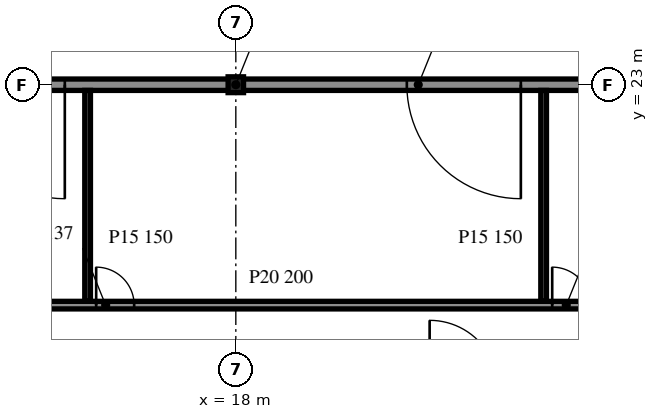
"""IFC4 building model, lengths in metres.
Left out: names, types, materials, properties, quantities, classifications, styles, units other than length and angle.
Written with IfcOpenShell. Run it as: python <this file> out.ifc"""

import sys

from ifc_helpers import new_model, si_unit, direction, frame, frame_2d, origin, origin_2d, place, context, subcontext, project, spatial, rectangle, i_section, extrude, element, fill, save


model = new_model("IFC4")
c1 = context("Model", 3, precision=1e-05, world=origin(), true_north=direction((0.0, 1.0)))
c2 = subcontext(c1, "Body", "Model", "MODEL_VIEW")
j1 = project(units=[si_unit("LENGTHUNIT", "METRE"), si_unit("PLANEANGLEUNIT", "RADIAN")], contexts=[c1])
p1 = place(None, origin())
s1 = spatial("IfcSite", under=j1, at=p1, CompositionType="ELEMENT")
p2 = place(p1, origin())
s2 = spatial("IfcBuilding", under=s1, at=p2, CompositionType="ELEMENT")
p3 = place(p2, frame((0.0, 0.0, 159.2)))
s3 = spatial("IfcBuildingStorey", under=s2, at=p3, CompositionType="ELEMENT", Elevation=159.2)
p4 = place(p3, frame((18.0, 23.0, -0.34), z_axis=(0.0, 0.0, 1.0), x_axis=(1.0, 0.0, 0.0)))
e1 = element("IfcColumn", 1, at=p4, inside=s3, PredefinedType="COLUMN", context=c2, shape_type="SweptSolid", body=[
    extrude(i_section(OverallWidth=0.406, OverallDepth=0.417, WebThickness=0.03, FlangeThickness=0.048, at=origin_2d()), origin(), (0.0, 0.0, 1.0), 3.8),
])
p5 = place(p3, frame((29.985, 23.0, 0.0), z_axis=(0.0, 0.0, 1.0), x_axis=(-1.0, 0.0, 0.0)))
e2 = element("IfcWall", 2, at=p5, inside=s3, PredefinedType="NOTDEFINED", context=c2, shape_type="SweptSolid", body=[
    extrude(rectangle(XDim=11.97, YDim=0.3, at=frame_2d((5.985, 0.0))), origin(), (0.0, 0.0, 1.0), 2.782),
])
p6 = place(p5, frame((4.485, 0.0, 0.0)))
e3 = element("IfcOpeningElement", 3, at=p6, cuts=e2, PredefinedType="OPENING", context=c2, shape_type="SweptSolid", body=[
    extrude(rectangle(XDim=3.0, YDim=2.4, at=frame_2d((1.5, 1.2))), frame((0.0, 0.16, 0.0), z_axis=(0.0, -1.0, 0.0), x_axis=(1.0, 0.0, 0.0)), (0.0, 0.0, 1.0), 0.32),
])
p7 = place(p3, frame((17.985, 23.0, 0.0), z_axis=(0.0, 0.0, 1.0), x_axis=(-1.0, 0.0, 0.0)))
e4 = element("IfcWall", 4, at=p7, inside=s3, PredefinedType="NOTDEFINED", context=c2, shape_type="SweptSolid", body=[
    extrude(rectangle(XDim=11.97, YDim=0.3, at=frame_2d((5.985, 0.0))), origin(), (0.0, 0.0, 1.0), 2.782),
])
p8 = place(p7, frame((4.485, 0.0, 0.0)))
e5 = element("IfcOpeningElement", 5, at=p8, cuts=e4, PredefinedType="OPENING", context=c2, shape_type="SweptSolid", body=[
    extrude(rectangle(XDim=3.0, YDim=2.4, at=frame_2d((1.5, 1.2))), frame((0.0, 0.16, 0.0), z_axis=(0.0, -1.0, 0.0), x_axis=(1.0, 0.0, 0.0)), (0.0, 0.0, 1.0), 0.32),
])
p9 = place(p3, frame((-47.975, 17.2, 0.0), z_axis=(0.0, 0.0, 1.0), x_axis=(1.0, 0.0, 0.0)))
e6 = element("IfcWall", 6, at=p9, inside=s3, PredefinedType="PARTITIONING", context=c2, shape_type="SweptSolid", body=[
    extrude(rectangle(XDim=95.95, YDim=0.2, at=frame_2d((47.975, 0.0))), origin(), (0.0, 0.0, 1.0), 3.46),
])
p10 = place(p9, frame((4.5, 0.0, 0.0)))
e7 = element("IfcOpeningElement", 7, at=p10, cuts=e6, PredefinedType="OPENING", context=c2, shape_type="SweptSolid", body=[
    extrude(rectangle(XDim=1.0, YDim=2.1, at=frame_2d((0.5, 1.05))), frame((0.0, 0.11, 0.0), z_axis=(0.0, -1.0, 0.0), x_axis=(1.0, 0.0, 0.0)), (0.0, 0.0, 1.0), 0.22),
])
p11 = place(p9, frame((10.5, 0.0, 0.0)))
e8 = element("IfcOpeningElement", 8, at=p11, cuts=e6, PredefinedType="OPENING", context=c2, shape_type="SweptSolid", body=[
    extrude(rectangle(XDim=1.0, YDim=2.1, at=frame_2d((0.5, 1.05))), frame((0.0, 0.11, 0.0), z_axis=(0.0, -1.0, 0.0), x_axis=(1.0, 0.0, 0.0)), (0.0, 0.0, 1.0), 0.22),
])
p12 = place(p9, frame((22.7, 0.0, 0.0)))
e9 = element("IfcOpeningElement", 9, at=p12, cuts=e6, PredefinedType="OPENING", context=c2, shape_type="SweptSolid", body=[
    extrude(rectangle(XDim=0.9, YDim=2.1, at=frame_2d((0.45, 1.05))), frame((0.0, 0.11, 0.0), z_axis=(0.0, -1.0, 0.0), x_axis=(1.0, 0.0, 0.0)), (0.0, 0.0, 1.0), 0.22),
])
p13 = place(p9, frame((25.7, 0.0, 0.0)))
e10 = element("IfcOpeningElement", 10, at=p13, cuts=e6, PredefinedType="OPENING", context=c2, shape_type="SweptSolid", body=[
    extrude(rectangle(XDim=1.2, YDim=2.1, at=frame_2d((0.6, 1.05))), frame((0.0, 0.11, 0.0), z_axis=(0.0, -1.0, 0.0), x_axis=(1.0, 0.0, 0.0)), (0.0, 0.0, 1.0), 0.22),
])
p14 = place(p9, frame((28.7, 0.0, 0.0)))
e11 = element("IfcOpeningElement", 11, at=p14, cuts=e6, PredefinedType="OPENING", context=c2, shape_type="SweptSolid", body=[
    extrude(rectangle(XDim=0.9, YDim=2.1, at=frame_2d((0.45, 1.05))), frame((0.0, 0.11, 0.0), z_axis=(0.0, -1.0, 0.0), x_axis=(1.0, 0.0, 0.0)), (0.0, 0.0, 1.0), 0.22),
])
p15 = place(p9, frame((36.7, 0.0, 0.0)))
e12 = element("IfcOpeningElement", 12, at=p15, cuts=e6, PredefinedType="OPENING", context=c2, shape_type="SweptSolid", body=[
    extrude(rectangle(XDim=1.0, YDim=2.1, at=frame_2d((0.5, 1.05))), frame((0.0, 0.11, 0.0), z_axis=(0.0, -1.0, 0.0), x_axis=(1.0, 0.0, 0.0)), (0.0, 0.0, 1.0), 0.22),
])
p16 = place(p9, frame((46.5, 0.0, 0.0)))
e13 = element("IfcOpeningElement", 13, at=p16, cuts=e6, PredefinedType="OPENING", context=c2, shape_type="SweptSolid", body=[
    extrude(rectangle(XDim=1.0, YDim=2.1, at=frame_2d((0.5, 1.05))), frame((0.0, 0.11, 0.0), z_axis=(0.0, -1.0, 0.0), x_axis=(1.0, 0.0, 0.0)), (0.0, 0.0, 1.0), 0.22),
])
p17 = place(p9, frame((48.1, 0.0, 0.0)))
e14 = element("IfcOpeningElement", 14, at=p17, cuts=e6, PredefinedType="OPENING", context=c2, shape_type="SweptSolid", body=[
    extrude(rectangle(XDim=0.9, YDim=2.1, at=frame_2d((0.45, 1.05))), frame((0.0, 0.11, 0.0), z_axis=(0.0, -1.0, 0.0), x_axis=(1.0, 0.0, 0.0)), (0.0, 0.0, 1.0), 0.22),
])
p18 = place(p9, frame((51.5, 0.0, 0.0)))
e15 = element("IfcOpeningElement", 15, at=p18, cuts=e6, PredefinedType="OPENING", context=c2, shape_type="SweptSolid", body=[
    extrude(rectangle(XDim=1.2, YDim=2.1, at=frame_2d((0.6, 1.05))), frame((0.0, 0.11, 0.0), z_axis=(0.0, -1.0, 0.0), x_axis=(1.0, 0.0, 0.0)), (0.0, 0.0, 1.0), 0.22),
])
p19 = place(p9, frame((54.1, 0.0, 0.0)))
e16 = element("IfcOpeningElement", 16, at=p19, cuts=e6, PredefinedType="OPENING", context=c2, shape_type="SweptSolid", body=[
    extrude(rectangle(XDim=0.9, YDim=2.1, at=frame_2d((0.45, 1.05))), frame((0.0, 0.11, 0.0), z_axis=(0.0, -1.0, 0.0), x_axis=(1.0, 0.0, 0.0)), (0.0, 0.0, 1.0), 0.22),
])
p20 = place(p9, frame((62.3, 0.0, 0.0)))
e17 = element("IfcOpeningElement", 17, at=p20, cuts=e6, PredefinedType="OPENING", context=c2, shape_type="SweptSolid", body=[
    extrude(rectangle(XDim=1.0, YDim=2.1, at=frame_2d((0.5, 1.05))), frame((0.0, 0.11, 0.0), z_axis=(0.0, -1.0, 0.0), x_axis=(1.0, 0.0, 0.0)), (0.0, 0.0, 1.0), 0.22),
])
p21 = place(p9, frame((74.3, 0.0, 0.0)))
e18 = element("IfcOpeningElement", 18, at=p21, cuts=e6, PredefinedType="OPENING", context=c2, shape_type="SweptSolid", body=[
    extrude(rectangle(XDim=1.0, YDim=2.1, at=frame_2d((0.5, 1.05))), frame((0.0, 0.11, 0.0), z_axis=(0.0, -1.0, 0.0), x_axis=(1.0, 0.0, 0.0)), (0.0, 0.0, 1.0), 0.22),
])
p22 = place(p9, frame((78.1, 0.0, 0.0)))
e19 = element("IfcOpeningElement", 19, at=p22, cuts=e6, PredefinedType="OPENING", context=c2, shape_type="SweptSolid", body=[
    extrude(rectangle(XDim=0.9, YDim=2.1, at=frame_2d((0.45, 1.05))), frame((0.0, 0.11, 0.0), z_axis=(0.0, -1.0, 0.0), x_axis=(1.0, 0.0, 0.0)), (0.0, 0.0, 1.0), 0.22),
])
p23 = place(p9, frame((84.1, 0.0, 0.0)))
e20 = element("IfcOpeningElement", 20, at=p23, cuts=e6, PredefinedType="OPENING", context=c2, shape_type="SweptSolid", body=[
    extrude(rectangle(XDim=1.2, YDim=2.1, at=frame_2d((0.6, 1.05))), frame((0.0, 0.11, 0.0), z_axis=(0.0, -1.0, 0.0), x_axis=(1.0, 0.0, 0.0)), (0.0, 0.0, 1.0), 0.22),
])
for number, where, z_axis, x_axis in (
    (21, (14.1, 17.3, 0.0), (0.0, 0.0, 1.0), (0.0, 1.0, 0.0)),
    (22, (26.1, 17.3, 0.0), (0.0, 0.0, 1.0), (0.0, 1.0, 0.0)),
):
    element("IfcWall", number, at=place(p3, frame(where, z_axis=z_axis, x_axis=x_axis)), inside=s3, PredefinedType="PARTITIONING", context=c2, shape_type="SweptSolid", body=[
        extrude(rectangle(XDim=5.55, YDim=0.15, at=frame_2d((2.775, 0.0))), origin(), (0.0, 0.0, 1.0), 3.46),
    ])
p24 = place(p6, origin())
e23 = element("IfcDoor", 23, at=p24, inside=s3, OperationType="SINGLE_SWING_LEFT", PredefinedType="DOOR", context=c2, shape_type="SweptSolid", body=[
    extrude(rectangle(XDim=3.0, YDim=2.4, at=frame_2d((1.5, 1.2))), frame((0.0, 0.025, 0.0), z_axis=(0.0, -1.0, 0.0), x_axis=(1.0, 0.0, 0.0)), (0.0, 0.0, 1.0), 0.05),
])
fill(e3, e23)
p25 = place(p8, origin())
e24 = element("IfcDoor", 24, at=p25, inside=s3, OperationType="SINGLE_SWING_LEFT", PredefinedType="DOOR", context=c2, shape_type="SweptSolid", body=[
    extrude(rectangle(XDim=3.0, YDim=2.4, at=frame_2d((1.5, 1.2))), frame((0.0, 0.025, 0.0), z_axis=(0.0, -1.0, 0.0), x_axis=(1.0, 0.0, 0.0)), (0.0, 0.0, 1.0), 0.05),
])
fill(e5, e24)
p26 = place(p20, origin())
e25 = element("IfcDoor", 25, at=p26, inside=s3, OperationType="SINGLE_SWING_RIGHT", PredefinedType="DOOR", context=c2, shape_type="SweptSolid", body=[
    extrude(rectangle(XDim=1.0, YDim=2.1, at=frame_2d((0.5, 1.05))), frame((0.0, 0.025, 0.0), z_axis=(0.0, -1.0, 0.0), x_axis=(1.0, 0.0, 0.0)), (0.0, 0.0, 1.0), 0.05),
])
fill(e17, e25)
p27 = place(p21, origin())
e26 = element("IfcDoor", 26, at=p27, inside=s3, OperationType="SINGLE_SWING_RIGHT", PredefinedType="DOOR", context=c2, shape_type="SweptSolid", body=[
    extrude(rectangle(XDim=1.0, YDim=2.1, at=frame_2d((0.5, 1.05))), frame((0.0, 0.025, 0.0), z_axis=(0.0, -1.0, 0.0), x_axis=(1.0, 0.0, 0.0)), (0.0, 0.0, 1.0), 0.05),
])
fill(e18, e26)
save(model, sys.argv[1])
